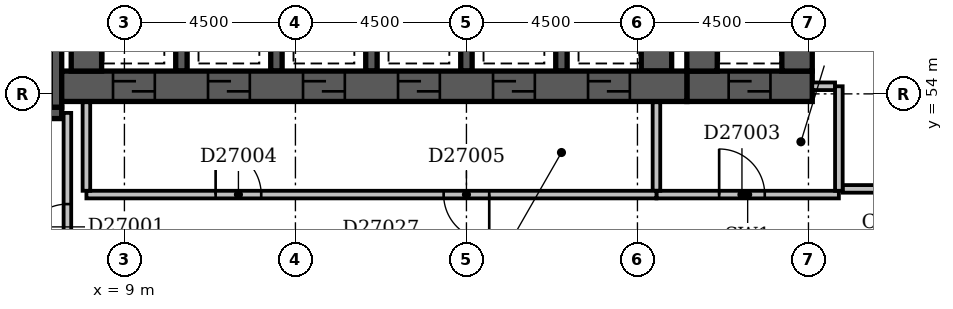
"""IFC4 building model, lengths in metres.
Left out: names, types, materials, properties, quantities, classifications, styles, units other than length and angle.
Written with IfcOpenShell. Run it as: python <this file> out.ifc"""

import sys

from ifc_helpers import new_model, si_unit, direction, frame, frame_2d, origin, place, context, subcontext, project, spatial, rectangle, extrude, element, fill, save


model = new_model("IFC4")
c1 = context("Model", 3, precision=1e-05, world=origin(), true_north=direction((0.0, 1.0)))
c2 = subcontext(c1, "Body", "Model", "MODEL_VIEW")
j1 = project(units=[si_unit("LENGTHUNIT", "METRE"), si_unit("PLANEANGLEUNIT", "RADIAN")], contexts=[c1])
p1 = place(None, origin())
s1 = spatial("IfcSite", under=j1, at=p1, CompositionType="ELEMENT")
p2 = place(p1, origin())
s2 = spatial("IfcBuilding", under=s1, at=p2, CompositionType="ELEMENT")
p3 = place(p2, frame((0.0, 0.0, 108.2)))
s3 = spatial("IfcBuildingStorey", under=s2, at=p3, CompositionType="ELEMENT", Elevation=108.2)
p4 = place(p3, frame((0.35, 53.5, -0.45), z_axis=(0.0, 0.0, 1.0), x_axis=(1.0, 0.0, 0.0)))
e1 = element("IfcWall", 1, at=p4, inside=s3, PredefinedType="SHEAR", context=c2, shape_type="SweptSolid", body=[
    extrude(rectangle(XDim=7.0, YDim=0.3, at=frame_2d((3.5, 0.0))), origin(), (0.0, 0.0, 1.0), 5.35),
])
p5 = place(p4, frame((5.58, 0.0, 0.45)))
e2 = element("IfcOpeningElement", 2, at=p5, cuts=e1, PredefinedType="OPENING", context=c2, shape_type="SweptSolid", body=[
    extrude(rectangle(XDim=1.1, YDim=2.1, at=frame_2d((0.55, 1.05))), frame((0.0, 0.162, 0.0), z_axis=(0.0, -1.0, 0.0), x_axis=(1.0, 0.0, 0.0)), (0.0, 0.0, 1.0), 0.324),
])
p6 = place(p3, frame((7.2, 53.65, -0.45), z_axis=(0.0, 0.0, 1.0), x_axis=(0.0, 1.0, 0.0)))
e3 = element("IfcWall", 3, at=p6, inside=s3, PredefinedType="SHEAR", context=c2, shape_type="SweptSolid", body=[
    extrude(rectangle(XDim=4.2, YDim=0.3, at=frame_2d((2.1, 0.0))), origin(), (0.0, 0.0, 1.0), 5.35),
])
p7 = place(p3, frame((7.35, 54.2, -0.45), z_axis=(0.0, 0.0, 1.0), x_axis=(1.0, 0.0, 0.0)))
e4 = element("IfcWall", 4, at=p7, inside=s3, PredefinedType="SHEAR", context=c2, shape_type="SweptSolid", body=[
    extrude(rectangle(XDim=16.45, YDim=0.8, at=frame_2d((8.225, 0.0))), origin(), (0.0, 0.0, 1.0), 5.35),
])
p8 = place(p7, frame((1.35, 0.0, 0.45)))
e5 = element("IfcOpeningElement", 5, at=p8, cuts=e4, PredefinedType="OPENING", context=c2, shape_type="SweptSolid", body=[
    extrude(rectangle(XDim=1.1, YDim=2.1, at=frame_2d((0.55, 1.05))), frame((0.0, 0.412, 0.0), z_axis=(0.0, -1.0, 0.0), x_axis=(1.0, 0.0, 0.0)), (0.0, 0.0, 1.0), 0.824),
])
p9 = place(p7, frame((3.85, 0.0, 0.45)))
e6 = element("IfcOpeningElement", 6, at=p9, cuts=e4, PredefinedType="OPENING", context=c2, shape_type="SweptSolid", body=[
    extrude(rectangle(XDim=1.1, YDim=2.1, at=frame_2d((0.55, 1.05))), frame((0.0, 0.412, 0.0), z_axis=(0.0, -1.0, 0.0), x_axis=(1.0, 0.0, 0.0)), (0.0, 0.0, 1.0), 0.824),
])
p10 = place(p7, frame((6.35, 0.0, 0.45)))
e7 = element("IfcOpeningElement", 7, at=p10, cuts=e4, PredefinedType="OPENING", context=c2, shape_type="SweptSolid", body=[
    extrude(rectangle(XDim=1.1, YDim=2.1, at=frame_2d((0.55, 1.05))), frame((0.0, 0.412, 0.0), z_axis=(0.0, -1.0, 0.0), x_axis=(1.0, 0.0, 0.0)), (0.0, 0.0, 1.0), 0.824),
])
p11 = place(p7, frame((8.85, 0.0, 0.45)))
e8 = element("IfcOpeningElement", 8, at=p11, cuts=e4, PredefinedType="OPENING", context=c2, shape_type="SweptSolid", body=[
    extrude(rectangle(XDim=1.1, YDim=2.1, at=frame_2d((0.55, 1.05))), frame((0.0, 0.412, 0.0), z_axis=(0.0, -1.0, 0.0), x_axis=(1.0, 0.0, 0.0)), (0.0, 0.0, 1.0), 0.824),
])
p12 = place(p7, frame((11.35, 0.0, 0.45)))
e9 = element("IfcOpeningElement", 9, at=p12, cuts=e4, PredefinedType="OPENING", context=c2, shape_type="SweptSolid", body=[
    extrude(rectangle(XDim=1.1, YDim=2.1, at=frame_2d((0.55, 1.05))), frame((0.0, 0.412, 0.0), z_axis=(0.0, -1.0, 0.0), x_axis=(1.0, 0.0, 0.0)), (0.0, 0.0, 1.0), 0.824),
])
p13 = place(p7, frame((13.85, 0.0, 0.45)))
e10 = element("IfcOpeningElement", 10, at=p13, cuts=e4, PredefinedType="OPENING", context=c2, shape_type="SweptSolid", body=[
    extrude(rectangle(XDim=1.1, YDim=2.1, at=frame_2d((0.55, 1.05))), frame((0.0, 0.412, 0.0), z_axis=(0.0, -1.0, 0.0), x_axis=(1.0, 0.0, 0.0)), (0.0, 0.0, 1.0), 0.824),
])
p14 = place(p3, frame((8.0, 54.6, -0.45), z_axis=(0.0, 0.0, 1.0), x_axis=(0.0, 1.0, 0.0)))
e11 = element("IfcWall", 11, at=p14, inside=s3, PredefinedType="SHEAR", context=c2, shape_type="SweptSolid", body=[
    extrude(rectangle(XDim=3.0, YDim=0.8, at=frame_2d((1.5, 0.0))), origin(), (0.0, 0.0, 1.0), 5.35),
])
for number, where, z_axis, x_axis in (
    (12, (10.5, 54.6, -0.45), (0.0, 0.0, 1.0), (0.0, 1.0, 0.0)),
    (13, (13.0, 54.6, -0.45), (0.0, 0.0, 1.0), (0.0, 1.0, 0.0)),
    (14, (15.5, 54.6, -0.45), (0.0, 0.0, 1.0), (0.0, 1.0, 0.0)),
    (15, (18.0, 54.6, -0.45), (0.0, 0.0, 1.0), (0.0, 1.0, 0.0)),
    (16, (20.5, 54.6, -0.45), (0.0, 0.0, 1.0), (0.0, 1.0, 0.0)),
):
    element("IfcWall", number, at=place(p3, frame(where, z_axis=z_axis, x_axis=x_axis)), inside=s3, PredefinedType="SHEAR", context=c2, shape_type="SweptSolid", body=[
        extrude(rectangle(XDim=3.0, YDim=0.3, at=frame_2d((1.5, 0.0))), origin(), (0.0, 0.0, 1.0), 5.35),
    ])
p15 = place(p3, frame((23.0, 54.6, -0.45), z_axis=(0.0, 0.0, 1.0), x_axis=(0.0, 1.0, 0.0)))
e17 = element("IfcWall", 17, at=p15, inside=s3, PredefinedType="SHEAR", context=c2, shape_type="SweptSolid", body=[
    extrude(rectangle(XDim=3.0, YDim=0.8, at=frame_2d((1.5, 0.0))), origin(), (0.0, 0.0, 1.0), 5.35),
])
p16 = place(p3, frame((23.8, 54.2, -0.45), z_axis=(0.0, 0.0, 1.0), x_axis=(1.0, 0.0, 0.0)))
e18 = element("IfcWall", 18, at=p16, inside=s3, PredefinedType="SHEAR", context=c2, shape_type="SweptSolid", body=[
    extrude(rectangle(XDim=3.3, YDim=0.8, at=frame_2d((1.65, 0.0))), origin(), (0.0, 0.0, 1.0), 5.35),
])
p17 = place(p16, frame((1.1, 0.0, 0.45)))
e19 = element("IfcOpeningElement", 19, at=p17, cuts=e18, PredefinedType="OPENING", context=c2, shape_type="SweptSolid", body=[
    extrude(rectangle(XDim=1.1, YDim=2.1, at=frame_2d((0.55, 1.05))), frame((0.0, 0.412, 0.0), z_axis=(0.0, -1.0, 0.0), x_axis=(1.0, 0.0, 0.0)), (0.0, 0.0, 1.0), 0.824),
])
for number, where, z_axis, x_axis in (
    (20, (24.2, 54.6, -0.45), (0.0, 0.0, 1.0), (0.0, 1.0, 0.0)),
    (21, (26.7, 54.6, -0.45), (0.0, 0.0, 1.0), (0.0, 1.0, 0.0)),
):
    element("IfcWall", number, at=place(p3, frame(where, z_axis=z_axis, x_axis=x_axis)), inside=s3, PredefinedType="SHEAR", context=c2, shape_type="SweptSolid", body=[
        extrude(rectangle(XDim=3.0, YDim=0.8, at=frame_2d((1.5, 0.0))), origin(), (0.0, 0.0, 1.0), 5.35),
    ])
p18 = place(p3, frame((8.0, 51.35, 0.0), z_axis=(0.0, 0.0, 1.0), x_axis=(1.0, 0.0, 0.0)))
e22 = element("IfcWall", 22, at=p18, inside=s3, PredefinedType="PARTITIONING", context=c2, shape_type="SweptSolid", body=[
    extrude(rectangle(XDim=15.0, YDim=0.2, at=frame_2d((7.5, 0.0))), origin(), (0.0, 0.0, 1.0), 4.9),
])
p19 = place(p18, frame((3.4, 0.0, 0.0)))
e23 = element("IfcOpeningElement", 23, at=p19, cuts=e22, PredefinedType="OPENING", context=c2, shape_type="SweptSolid", body=[
    extrude(rectangle(XDim=1.2, YDim=2.1, at=frame_2d((0.6, 1.05))), frame((0.0, 0.112, 0.0), z_axis=(0.0, -1.0, 0.0), x_axis=(1.0, 0.0, 0.0)), (0.0, 0.0, 1.0), 0.224),
])
p20 = place(p18, frame((9.4, 0.0, 0.0)))
e24 = element("IfcOpeningElement", 24, at=p20, cuts=e22, PredefinedType="OPENING", context=c2, shape_type="SweptSolid", body=[
    extrude(rectangle(XDim=1.2, YDim=2.1, at=frame_2d((0.6, 1.05))), frame((0.0, 0.112, 0.0), z_axis=(0.0, -1.0, 0.0), x_axis=(1.0, 0.0, 0.0)), (0.0, 0.0, 1.0), 0.224),
])
for number, where, z_axis, x_axis in (
    (25, (23.0, 51.45, 0.0), (0.0, 0.0, 1.0), (0.0, 1.0, 0.0)),
    (26, (8.0, 51.45, 0.0), (0.0, 0.0, 1.0), (0.0, 1.0, 0.0)),
):
    element("IfcWall", number, at=place(p3, frame(where, z_axis=z_axis, x_axis=x_axis)), inside=s3, PredefinedType="PARTITIONING", context=c2, shape_type="SweptSolid", body=[
        extrude(rectangle(XDim=2.33, YDim=0.2, at=frame_2d((1.165, 0.0))), origin(), (0.0, 0.0, 1.0), 4.9),
    ])
p21 = place(p3, frame((23.0, 51.35, 0.0), z_axis=(0.0, 0.0, 1.0), x_axis=(1.0, 0.0, 0.0)))
e27 = element("IfcWall", 27, at=p21, inside=s3, PredefinedType="PARTITIONING", context=c2, shape_type="SweptSolid", body=[
    extrude(rectangle(XDim=4.8, YDim=0.2, at=frame_2d((2.4, 0.0))), origin(), (0.0, 0.0, 1.0), 4.9),
])
p22 = place(p21, frame((1.65, 0.0, 0.0)))
e28 = element("IfcOpeningElement", 28, at=p22, cuts=e27, PredefinedType="OPENING", context=c2, shape_type="SweptSolid", body=[
    extrude(rectangle(XDim=1.2, YDim=2.1, at=frame_2d((0.6, 1.05))), frame((0.0, 0.112, 0.0), z_axis=(0.0, -1.0, 0.0), x_axis=(1.0, 0.0, 0.0)), (0.0, 0.0, 1.0), 0.224),
])
p23 = place(p3, frame((27.8, 51.45, 0.0), z_axis=(0.0, 0.0, 1.0), x_axis=(0.0, 1.0, 0.0)))
e29 = element("IfcWall", 29, at=p23, inside=s3, PredefinedType="PARTITIONING", context=c2, shape_type="SweptSolid", body=[
    extrude(rectangle(XDim=2.75, YDim=0.2, at=frame_2d((1.375, 0.0))), origin(), (0.0, 0.0, 1.0), 4.9),
])
p24 = place(p3, frame((27.1, 54.2, 0.0), z_axis=(0.0, 0.0, 1.0), x_axis=(1.0, 0.0, 0.0)))
e30 = element("IfcWall", 30, at=p24, inside=s3, PredefinedType="PARTITIONING", context=c2, shape_type="SweptSolid", body=[
    extrude(rectangle(XDim=0.6, YDim=0.2, at=frame_2d((0.3, 0.0))), origin(), (0.0, 0.0, 1.0), 4.9),
])
p25 = place(p3, frame((7.5, 49.6, 0.0), z_axis=(0.0, 0.0, 1.0), x_axis=(0.0, 1.0, 0.0)))
e31 = element("IfcWall", 31, at=p25, inside=s3, PredefinedType="PARTITIONING", context=c2, shape_type="SweptSolid", body=[
    extrude(rectangle(XDim=3.9, YDim=0.2, at=frame_2d((1.95, 0.0))), origin(), (0.0, 0.0, 1.0), 4.9),
])
p26 = place(p25, frame((0.3, 0.0, 0.0)))
e32 = element("IfcOpeningElement", 32, at=p26, cuts=e31, PredefinedType="OPENING", context=c2, shape_type="SweptSolid", body=[
    extrude(rectangle(XDim=1.2, YDim=2.1, at=frame_2d((0.6, 1.05))), frame((0.0, 0.112, 0.0), z_axis=(0.0, -1.0, 0.0), x_axis=(1.0, 0.0, 0.0)), (0.0, 0.0, 1.0), 0.224),
])
p27 = place(p3, frame((31.9, 51.5, 0.0), z_axis=(0.0, 0.0, 1.0), x_axis=(-1.0, 0.0, 0.0)))
e33 = element("IfcWall", 33, at=p27, inside=s3, PredefinedType="PARTITIONING", context=c2, shape_type="SweptSolid", body=[
    extrude(rectangle(XDim=4.0, YDim=0.2, at=frame_2d((2.0, 0.0))), origin(), (0.0, 0.0, 1.0), 4.9),
])
p28 = place(p27, frame((1.4, 0.0, 0.0)))
e34 = element("IfcOpeningElement", 34, at=p28, cuts=e33, PredefinedType="OPENING", context=c2, shape_type="SweptSolid", body=[
    extrude(rectangle(XDim=1.2, YDim=2.1, at=frame_2d((0.6, 1.05))), frame((0.0, 0.112, 0.0), z_axis=(0.0, -1.0, 0.0), x_axis=(1.0, 0.0, 0.0)), (0.0, 0.0, 1.0), 0.224),
])
p29 = place(p26, origin())
e35 = element("IfcDoor", 35, at=p29, inside=s3, OperationType="SINGLE_SWING_LEFT", PredefinedType="DOOR", context=c2, shape_type="SweptSolid", body=[
    extrude(rectangle(XDim=1.2, YDim=2.1, at=frame_2d((0.6, 1.05))), frame((0.0, 0.025, 0.0), z_axis=(0.0, -1.0, 0.0), x_axis=(1.0, 0.0, 0.0)), (0.0, 0.0, 1.0), 0.05),
])
fill(e32, e35)
p30 = place(p22, origin())
e36 = element("IfcDoor", 36, at=p30, inside=s3, OperationType="SINGLE_SWING_LEFT", PredefinedType="DOOR", context=c2, shape_type="SweptSolid", body=[
    extrude(rectangle(XDim=1.2, YDim=2.1, at=frame_2d((0.6, 1.05))), frame((0.0, 0.025, 0.0), z_axis=(0.0, -1.0, 0.0), x_axis=(1.0, 0.0, 0.0)), (0.0, 0.0, 1.0), 0.05),
])
fill(e28, e36)
p31 = place(p17, origin())
e37 = element("IfcDoor", 37, at=p31, inside=s3, OperationType="SLIDING_TO_LEFT", PredefinedType="DOOR", context=c2, shape_type="SweptSolid", body=[
    extrude(rectangle(XDim=1.1, YDim=2.1, at=frame_2d((0.55, 1.05))), frame((0.0, 0.025, 0.0), z_axis=(0.0, -1.0, 0.0), x_axis=(1.0, 0.0, 0.0)), (0.0, 0.0, 1.0), 0.05),
])
fill(e19, e37)
p32 = place(p8, origin())
e38 = element("IfcDoor", 38, at=p32, inside=s3, OperationType="SLIDING_TO_LEFT", PredefinedType="DOOR", context=c2, shape_type="SweptSolid", body=[
    extrude(rectangle(XDim=1.1, YDim=2.1, at=frame_2d((0.55, 1.05))), frame((0.0, 0.025, 0.0), z_axis=(0.0, -1.0, 0.0), x_axis=(1.0, 0.0, 0.0)), (0.0, 0.0, 1.0), 0.05),
])
fill(e5, e38)
p33 = place(p9, origin())
e39 = element("IfcDoor", 39, at=p33, inside=s3, OperationType="SLIDING_TO_LEFT", PredefinedType="DOOR", context=c2, shape_type="SweptSolid", body=[
    extrude(rectangle(XDim=1.1, YDim=2.1, at=frame_2d((0.55, 1.05))), frame((0.0, 0.025, 0.0), z_axis=(0.0, -1.0, 0.0), x_axis=(1.0, 0.0, 0.0)), (0.0, 0.0, 1.0), 0.05),
])
fill(e6, e39)
p34 = place(p10, origin())
e40 = element("IfcDoor", 40, at=p34, inside=s3, OperationType="SLIDING_TO_LEFT", PredefinedType="DOOR", context=c2, shape_type="SweptSolid", body=[
    extrude(rectangle(XDim=1.1, YDim=2.1, at=frame_2d((0.55, 1.05))), frame((0.0, 0.025, 0.0), z_axis=(0.0, -1.0, 0.0), x_axis=(1.0, 0.0, 0.0)), (0.0, 0.0, 1.0), 0.05),
])
fill(e7, e40)
p35 = place(p11, origin())
e41 = element("IfcDoor", 41, at=p35, inside=s3, OperationType="SLIDING_TO_LEFT", PredefinedType="DOOR", context=c2, shape_type="SweptSolid", body=[
    extrude(rectangle(XDim=1.1, YDim=2.1, at=frame_2d((0.55, 1.05))), frame((0.0, 0.025, 0.0), z_axis=(0.0, -1.0, 0.0), x_axis=(1.0, 0.0, 0.0)), (0.0, 0.0, 1.0), 0.05),
])
fill(e8, e41)
p36 = place(p12, origin())
e42 = element("IfcDoor", 42, at=p36, inside=s3, OperationType="SLIDING_TO_LEFT", PredefinedType="DOOR", context=c2, shape_type="SweptSolid", body=[
    extrude(rectangle(XDim=1.1, YDim=2.1, at=frame_2d((0.55, 1.05))), frame((0.0, 0.025, 0.0), z_axis=(0.0, -1.0, 0.0), x_axis=(1.0, 0.0, 0.0)), (0.0, 0.0, 1.0), 0.05),
])
fill(e9, e42)
p37 = place(p13, origin())
e43 = element("IfcDoor", 43, at=p37, inside=s3, OperationType="SLIDING_TO_LEFT", PredefinedType="DOOR", context=c2, shape_type="SweptSolid", body=[
    extrude(rectangle(XDim=1.1, YDim=2.1, at=frame_2d((0.55, 1.05))), frame((0.0, 0.025, 0.0), z_axis=(0.0, -1.0, 0.0), x_axis=(1.0, 0.0, 0.0)), (0.0, 0.0, 1.0), 0.05),
])
fill(e10, e43)
p38 = place(p19, origin())
e44 = element("IfcDoor", 44, at=p38, inside=s3, OperationType="SINGLE_SWING_LEFT", PredefinedType="DOOR", context=c2, shape_type="SweptSolid", body=[
    extrude(rectangle(XDim=1.2, YDim=2.1, at=frame_2d((0.6, 1.05))), frame((0.0, 0.025, 0.0), z_axis=(0.0, -1.0, 0.0), x_axis=(1.0, 0.0, 0.0)), (0.0, 0.0, 1.0), 0.05),
])
fill(e23, e44)
p39 = place(p20, origin())
e45 = element("IfcDoor", 45, at=p39, inside=s3, OperationType="SINGLE_SWING_RIGHT", PredefinedType="DOOR", context=c2, shape_type="SweptSolid", body=[
    extrude(rectangle(XDim=1.2, YDim=2.1, at=frame_2d((0.6, 1.05))), frame((0.0, 0.025, 0.0), z_axis=(0.0, -1.0, 0.0), x_axis=(1.0, 0.0, 0.0)), (0.0, 0.0, 1.0), 0.05),
])
fill(e24, e45)
save(model, sys.argv[1])
